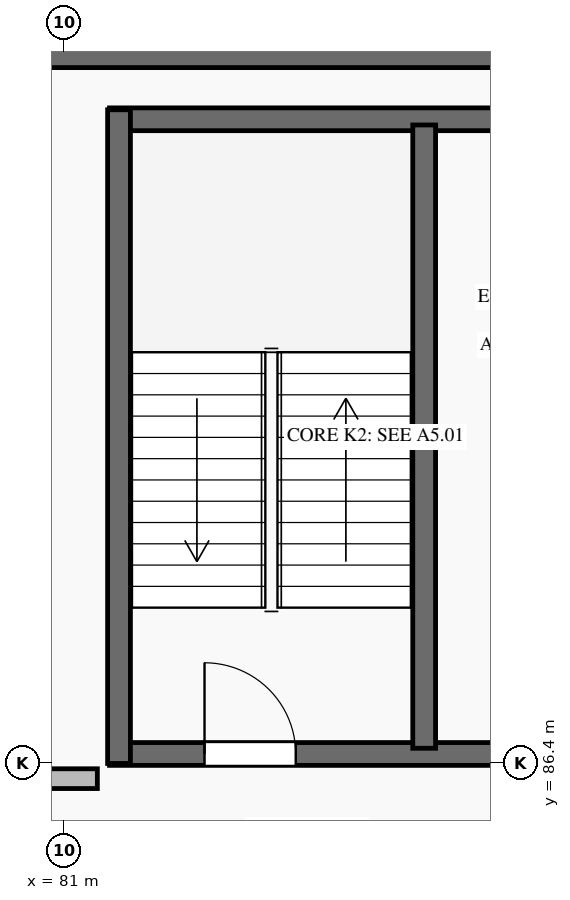
"""IFC4 building model, lengths in metres.
Left out: names, types, materials, properties, quantities, classifications, styles, units other than length and angle.
Written with IfcOpenShell. Run it as: python <this file> out.ifc"""

import sys

from ifc_helpers import new_model, si_unit, direction, frame, frame_2d, origin, place, context, subcontext, project, spatial, rectangle, extrude, element, fill, save


model = new_model("IFC4")
c1 = context("Model", 3, precision=1e-05, world=origin(), true_north=direction((0.0, 1.0)))
c2 = subcontext(c1, "Body", "Model", "MODEL_VIEW")
j1 = project(units=[si_unit("LENGTHUNIT", "METRE"), si_unit("PLANEANGLEUNIT", "RADIAN")], contexts=[c1])
p1 = place(None, origin())
s1 = spatial("IfcSite", under=j1, at=p1, CompositionType="ELEMENT")
p2 = place(p1, origin())
s2 = spatial("IfcBuilding", under=s1, at=p2, CompositionType="ELEMENT")
p3 = place(p2, frame((0.0, 0.0, -4.5)))
s3 = spatial("IfcBuildingStorey", under=s2, at=p3, CompositionType="ELEMENT", Elevation=-4.5)
p4 = place(p3, frame((116.78, 95.78, 0.0), z_axis=(0.0, 0.0, 1.0), x_axis=(-1.0, 0.0, 0.0)))
e1 = element("IfcWall", 1, at=p4, inside=s3, PredefinedType="SHEAR", context=c2, shape_type="SweptSolid", body=[
    extrude(rectangle(XDim=44.4, YDim=0.45, at=frame_2d((22.2, 0.0))), origin(), (0.0, 0.0, 1.0), 4.2),
])
p5 = place(p3, frame((81.6, 86.525, 0.0), z_axis=(0.0, 0.0, 1.0), x_axis=(1.0, 0.0, 0.0)))
e2 = element("IfcWall", 2, at=p5, inside=s3, PredefinedType="SHEAR", context=c2, shape_type="SweptSolid", body=[
    extrude(rectangle(XDim=7.0, YDim=0.3, at=frame_2d((3.5, 0.0))), origin(), (0.0, 0.0, 1.0), 4.5),
])
p6 = place(p5, frame((1.25, 0.0, 0.0)))
e3 = element("IfcOpeningElement", 3, at=p6, cuts=e2, PredefinedType="OPENING", context=c2, shape_type="SweptSolid", body=[
    extrude(rectangle(XDim=1.2, YDim=2.15, at=frame_2d((0.6, 1.075))), frame((0.0, 0.165, 0.0), z_axis=(0.0, -1.0, 0.0), x_axis=(1.0, 0.0, 0.0)), (0.0, 0.0, 1.0), 0.33),
])
p7 = place(p3, frame((81.6, 94.875, 0.0), z_axis=(0.0, 0.0, 1.0), x_axis=(1.0, 0.0, 0.0)))
e4 = element("IfcWall", 4, at=p7, inside=s3, PredefinedType="SHEAR", context=c2, shape_type="SweptSolid", body=[
    extrude(rectangle(XDim=7.0, YDim=0.3, at=frame_2d((3.5, 0.0))), origin(), (0.0, 0.0, 1.0), 4.5),
])
p8 = place(p3, frame((81.725, 86.4, 0.0), z_axis=(0.0, 0.0, 1.0), x_axis=(0.0, 1.0, 0.0)))
e5 = element("IfcWall", 5, at=p8, inside=s3, PredefinedType="SHEAR", context=c2, shape_type="SweptSolid", body=[
    extrude(rectangle(XDim=8.6, YDim=0.3, at=frame_2d((4.3, 0.0))), origin(), (0.0, 0.0, 1.0), 4.5),
])
p9 = place(p3, frame((85.74, 86.6, 0.0), z_axis=(0.0, 0.0, 1.0), x_axis=(0.0, 1.0, 0.0)))
e6 = element("IfcWall", 6, at=p9, inside=s3, PredefinedType="SHEAR", context=c2, shape_type="SweptSolid", body=[
    extrude(rectangle(XDim=8.2, YDim=0.3, at=frame_2d((4.1, 0.0))), origin(), (0.0, 0.0, 1.0), 4.5),
])
p10 = place(p3, frame((72.75, 86.2, 0.0), z_axis=(0.0, 0.0, 1.0), x_axis=(1.0, 0.0, 0.0)))
e7 = element("IfcWall", 7, at=p10, inside=s3, PredefinedType="PARTITIONING", context=c2, shape_type="SweptSolid", body=[
    extrude(rectangle(XDim=8.69, YDim=0.26, at=frame_2d((4.345, 0.0))), origin(), (0.0, 0.0, 1.0), 3.3),
])
p11 = place(p10, frame((2.895, 0.0, 0.0)))
e8 = element("IfcOpeningElement", 8, at=p11, cuts=e7, PredefinedType="OPENING", context=c2, shape_type="SweptSolid", body=[
    extrude(rectangle(XDim=1.5, YDim=2.25, at=frame_2d((0.75, 1.125))), frame((0.0, 0.145, 0.0), z_axis=(0.0, -1.0, 0.0), x_axis=(1.0, 0.0, 0.0)), (0.0, 0.0, 1.0), 0.29),
])
p12 = place(p6, origin())
e9 = element("IfcDoor", 9, at=p12, inside=s3, OperationType="SINGLE_SWING_LEFT", PredefinedType="DOOR", context=c2, shape_type="SweptSolid", body=[
    extrude(rectangle(XDim=1.2, YDim=2.15, at=frame_2d((0.6, 1.075))), frame((0.0, 0.025, 0.0), z_axis=(0.0, -1.0, 0.0), x_axis=(1.0, 0.0, 0.0)), (0.0, 0.0, 1.0), 0.05),
])
fill(e3, e9)
save(model, sys.argv[1])
